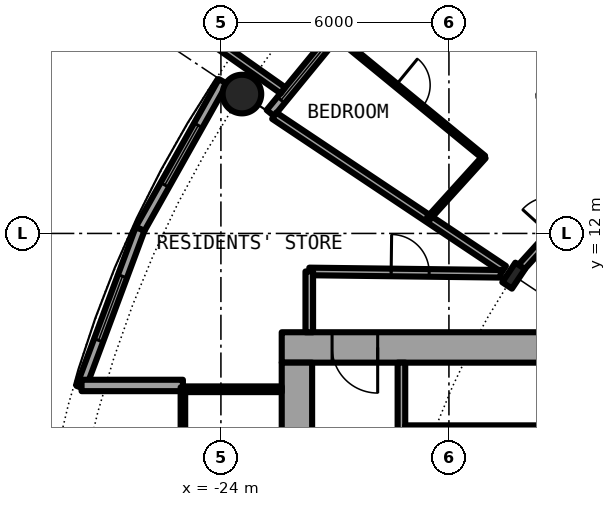
"""IFC4 building model, lengths in metres.
Left out: names, types, materials, properties, quantities, classifications, styles, units other than length and angle.
Written with IfcOpenShell. Run it as: python <this file> out.ifc"""

import sys

from ifc_helpers import new_model, si_unit, direction, frame, frame_2d, origin, origin_2d, place, context, subcontext, project, spatial, rectangle, hollow_circle, i_section, extrude, element, fill, save


model = new_model("IFC4")
c1 = context("Model", 3, precision=1e-05, world=origin(), true_north=direction((0.0, 1.0)))
c2 = subcontext(c1, "Body", "Model", "MODEL_VIEW")
j1 = project(units=[si_unit("LENGTHUNIT", "METRE"), si_unit("PLANEANGLEUNIT", "RADIAN")], contexts=[c1])
p1 = place(None, origin())
s1 = spatial("IfcSite", under=j1, at=p1, CompositionType="ELEMENT")
p2 = place(p1, origin())
s2 = spatial("IfcBuilding", under=s1, at=p2, CompositionType="ELEMENT")
p3 = place(p2, frame((0.0, 0.0, 50.25)))
s3 = spatial("IfcBuildingStorey", under=s2, at=p3, CompositionType="ELEMENT", Elevation=50.25)
p4 = place(p3, frame((-23.448, 15.667, 0.0), z_axis=(0.0, 0.0, 1.0), x_axis=(1.0, 0.0, 0.0)))
e1 = element("IfcColumn", 1, at=p4, inside=s3, PredefinedType="COLUMN", context=c2, shape_type="SweptSolid", body=[
    extrude(hollow_circle(Radius=0.508, WallThickness=0.05, at=origin_2d()), origin(), (0.0, 0.0, 1.0), 3.05),
])
p5 = place(p3, frame((-16.297, 10.889, 0.0), z_axis=(0.0, 0.0, 1.0), x_axis=(-0.831469612303, 0.55557023302, 0.0)))
e2 = element("IfcColumn", 2, at=p5, inside=s3, PredefinedType="COLUMN", context=c2, shape_type="SweptSolid", body=[
    extrude(i_section(OverallWidth=0.305, OverallDepth=0.62, WebThickness=0.021, FlangeThickness=0.04, FilletRadius=0.027, at=origin_2d()), origin(), (0.0, 0.0, 1.0), 3.05),
])
p6 = place(p3, frame((-19.304, 19.304, 0.0), z_axis=(0.0, 0.0, 1.0), x_axis=(-0.634382322723, -0.773019449054, 0.0)))
e3 = element("IfcWall", 3, at=p6, inside=s3, PredefinedType="SOLIDWALL", context=c2, shape_type="SweptSolid", body=[
    extrude(rectangle(XDim=5.352, YDim=0.25, at=frame_2d((2.676, 0.0))), origin(), (0.0, 0.0, 1.0), 2.7),
])
p7 = place(p6, frame((0.841, 0.0, 0.0)))
e4 = element("IfcOpeningElement", 4, at=p7, cuts=e3, PredefinedType="OPENING", context=c2, shape_type="SweptSolid", body=[
    extrude(rectangle(XDim=1.0, YDim=2.2, at=frame_2d((0.5, 1.1))), frame((0.0, 0.135, 0.0), z_axis=(0.0, -1.0, 0.0), x_axis=(1.0, 0.0, 0.0)), (0.0, 0.0, 1.0), 0.27),
])
p8 = place(p6, frame((3.111, 0.0, 0.3)))
e5 = element("IfcOpeningElement", 5, at=p8, cuts=e3, PredefinedType="OPENING", context=c2, shape_type="SweptSolid", body=[
    extrude(rectangle(XDim=1.8, YDim=2.1, at=frame_2d((0.9, 1.05))), frame((0.0, 0.135, 0.0), z_axis=(0.0, -1.0, 0.0), x_axis=(1.0, 0.0, 0.0)), (0.0, 0.0, 1.0), 0.27),
])
p9 = place(p3, frame((-22.37, 15.765, -0.03), z_axis=(0.0, 0.0, 1.0), x_axis=(-0.817256123454, 0.576274612209, 0.0)))
e6 = element("IfcWall", 6, at=p9, inside=s3, PredefinedType="SOLIDWALL", context=c2, shape_type="SweptSolid", body=[
    extrude(rectangle(XDim=2.933, YDim=0.2, at=frame_2d((1.466, 0.0))), origin(), (0.0, 0.0, 1.0), 2.73),
])
p10 = place(p3, frame((-23.946, 16.0, 0.0), z_axis=(0.0, 0.0, 1.0), x_axis=(-0.489696356642, -0.871893042919, 0.0)))
e7 = element("IfcWall", 7, at=p10, inside=s3, PredefinedType="SOLIDWALL", context=c2, shape_type="SweptSolid", body=[
    extrude(rectangle(XDim=4.454, YDim=0.25, at=frame_2d((2.227, 0.0))), origin(), (0.0, 0.0, 1.0), 2.7),
])
p11 = place(p10, frame((1.327, 0.0, 0.3)))
e8 = element("IfcOpeningElement", 8, at=p11, cuts=e7, PredefinedType="OPENING", context=c2, shape_type="SweptSolid", body=[
    extrude(rectangle(XDim=1.8, YDim=2.1, at=frame_2d((0.9, 1.05))), frame((0.0, 0.135, 0.0), z_axis=(0.0, -1.0, 0.0), x_axis=(1.0, 0.0, 0.0)), (0.0, 0.0, 1.0), 0.27),
])
p12 = place(p3, frame((-26.127, 12.117, 0.0), z_axis=(0.0, 0.0, 1.0), x_axis=(-0.349247811493, -0.937030397675, 0.0)))
e9 = element("IfcWall", 9, at=p12, inside=s3, PredefinedType="SOLIDWALL", context=c2, shape_type="SweptSolid", body=[
    extrude(rectangle(XDim=4.452, YDim=0.25, at=frame_2d((2.226, 0.0))), origin(), (0.0, 0.0, 1.0), 2.7),
])
p13 = place(p12, frame((1.327, 0.0, 0.3)))
e10 = element("IfcOpeningElement", 10, at=p13, cuts=e9, PredefinedType="OPENING", context=c2, shape_type="SweptSolid", body=[
    extrude(rectangle(XDim=1.8, YDim=2.1, at=frame_2d((0.9, 1.05))), frame((0.0, 0.135, 0.0), z_axis=(0.0, -1.0, 0.0), x_axis=(1.0, 0.0, 0.0)), (0.0, 0.0, 1.0), 0.27),
])
p14 = place(p3, frame((-25.0, 8.0, 0.0), z_axis=(0.0, 0.0, 1.0), x_axis=(-1.0, 0.0, 0.0)))
e11 = element("IfcWall", 11, at=p14, inside=s3, PredefinedType="SOLIDWALL", context=c2, shape_type="SweptSolid", body=[
    extrude(rectangle(XDim=2.667, YDim=0.3, at=frame_2d((1.333, 0.0))), origin(), (0.0, 0.0, 1.0), 2.7),
])
p15 = place(p3, frame((-8.2, 9.0, 0.0), z_axis=(0.0, 0.0, 1.0), x_axis=(-1.0, 0.0, 0.0)))
e12 = element("IfcWall", 12, at=p15, inside=s3, PredefinedType="SHEAR", context=c2, shape_type="SweptSolid", body=[
    extrude(rectangle(XDim=14.2, YDim=0.8, at=frame_2d((7.1, 0.0))), origin(), (0.0, 0.0, 1.0), 3.05),
])
p16 = place(p15, frame((11.675, 0.0, 0.0)))
e13 = element("IfcOpeningElement", 13, at=p16, cuts=e12, PredefinedType="OPENING", context=c2, shape_type="SweptSolid", body=[
    extrude(rectangle(XDim=1.2, YDim=2.3, at=frame_2d((0.6, 1.15))), frame((0.0, 0.41, 0.0), z_axis=(0.0, -1.0, 0.0), x_axis=(1.0, 0.0, 0.0)), (0.0, 0.0, 1.0), 0.82),
])
p17 = place(p3, frame((-22.0, -8.6, 0.0), z_axis=(0.0, 0.0, 1.0), x_axis=(0.0, 1.0, 0.0)))
e14 = element("IfcWall", 14, at=p17, inside=s3, PredefinedType="SHEAR", context=c2, shape_type="SweptSolid", body=[
    extrude(rectangle(XDim=17.2, YDim=0.8, at=frame_2d((8.6, 0.0))), origin(), (0.0, 0.0, 1.0), 3.05),
])
p18 = place(p17, frame((7.7, 0.0, 0.0)))
e15 = element("IfcOpeningElement", 15, at=p18, cuts=e14, PredefinedType="OPENING", context=c2, shape_type="SweptSolid", body=[
    extrude(rectangle(XDim=1.8, YDim=2.3, at=frame_2d((0.9, 1.15))), frame((0.0, 0.41, 0.0), z_axis=(0.0, -1.0, 0.0), x_axis=(1.0, 0.0, 0.0)), (0.0, 0.0, 1.0), 0.82),
])
p19 = place(p3, frame((-19.25, 8.6, 0.0), z_axis=(0.0, 0.0, 1.0), x_axis=(0.0, -1.0, 0.0)))
e16 = element("IfcWall", 16, at=p19, inside=s3, PredefinedType="SOLIDWALL", context=c2, shape_type="SweptSolid", body=[
    extrude(rectangle(XDim=7.025, YDim=0.2, at=frame_2d((3.513, 0.0))), origin(), (0.0, 0.0, 1.0), 2.7),
])
p20 = place(p19, frame((2.35, 0.0, 0.0)))
e17 = element("IfcOpeningElement", 17, at=p20, cuts=e16, PredefinedType="OPENING", context=c2, shape_type="SweptSolid", body=[
    extrude(rectangle(XDim=1.1, YDim=2.3, at=frame_2d((0.55, 1.15))), frame((0.0, 0.11, 0.0), z_axis=(0.0, -1.0, 0.0), x_axis=(1.0, 0.0, 0.0)), (0.0, 0.0, 1.0), 0.22),
])
p21 = place(p3, frame((-15.45, 6.875, 0.0), z_axis=(0.0, 0.0, 1.0), x_axis=(-1.0, 0.0, 0.0)))
e18 = element("IfcWall", 18, at=p21, inside=s3, PredefinedType="PARTITIONING", context=c2, shape_type="SweptSolid", body=[
    extrude(rectangle(XDim=3.7, YDim=0.15, at=frame_2d((1.85, 0.0))), origin(), (0.0, 0.0, 1.0), 2.7),
])
p22 = place(p21, frame((1.4, 0.0, 0.0)))
e19 = element("IfcOpeningElement", 19, at=p22, cuts=e18, PredefinedType="OPENING", context=c2, shape_type="SweptSolid", body=[
    extrude(rectangle(XDim=0.9, YDim=2.3, at=frame_2d((0.45, 1.15))), frame((0.0, 0.085, 0.0), z_axis=(0.0, -1.0, 0.0), x_axis=(1.0, 0.0, 0.0)), (0.0, 0.0, 1.0), 0.17),
])
p23 = place(p3, frame((-22.4, 7.9, 0.0), z_axis=(0.0, 0.0, 1.0), x_axis=(-1.0, 0.0, 0.0)))
e20 = element("IfcWall", 20, at=p23, inside=s3, PredefinedType="PARTITIONING", context=c2, shape_type="SweptSolid", body=[
    extrude(rectangle(XDim=2.54, YDim=0.15, at=frame_2d((1.27, 0.0))), origin(), (0.0, 0.0, 1.0), 2.7),
])
p24 = place(p3, frame((-25.0, 7.95, 0.0), z_axis=(0.0, 0.0, 1.0), x_axis=(0.0, -1.0, 0.0)))
e21 = element("IfcWall", 21, at=p24, inside=s3, PredefinedType="PARTITIONING", context=c2, shape_type="SweptSolid", body=[
    extrude(rectangle(XDim=15.9, YDim=0.12, at=frame_2d((7.95, 0.0))), origin(), (0.0, 0.0, 1.0), 2.7),
])
p25 = place(p24, frame((0.95, 0.0, 0.1)))
e22 = element("IfcOpeningElement", 22, at=p25, cuts=e21, PredefinedType="OPENING", context=c2, shape_type="SweptSolid", body=[
    extrude(rectangle(XDim=14.0, YDim=2.35, at=frame_2d((7.0, 1.175))), frame((0.0, 0.07, 0.0), z_axis=(0.0, -1.0, 0.0), x_axis=(1.0, 0.0, 0.0)), (0.0, 0.0, 1.0), 0.14),
])
p26 = place(p3, frame((-22.596, 15.097, 0.0), z_axis=(0.0, 0.0, 1.0), x_axis=(0.831507055747, -0.555514190857, 0.0)))
e23 = element("IfcWall", 23, at=p26, inside=s3, PredefinedType="PARTITIONING", context=c2, shape_type="SweptSolid", body=[
    extrude(rectangle(XDim=7.265, YDim=0.2, at=frame_2d((3.633, 0.0))), origin(), (0.0, 0.0, 1.0), 2.7),
])
p27 = place(p3, frame((-21.014, 17.231, 0.0), z_axis=(0.0, 0.0, 1.0), x_axis=(0.773219330916, -0.634138680651, 0.0)))
e24 = element("IfcWall", 24, at=p27, inside=s3, PredefinedType="PARTITIONING", context=c2, shape_type="SweptSolid", body=[
    extrude(rectangle(XDim=5.089, YDim=0.1, at=frame_2d((2.544, 0.0))), origin(), (0.0, 0.0, 1.0), 2.7),
])
p28 = place(p27, frame((2.095, 0.0, 0.0)))
e25 = element("IfcOpeningElement", 25, at=p28, cuts=e24, PredefinedType="OPENING", context=c2, shape_type="SweptSolid", body=[
    extrude(rectangle(XDim=0.9, YDim=2.3, at=frame_2d((0.45, 1.15))), frame((0.0, 0.06, 0.0), z_axis=(0.0, -1.0, 0.0), x_axis=(1.0, 0.0, 0.0)), (0.0, 0.0, 1.0), 0.12),
])
p29 = place(p3, frame((-17.243, 21.005, 0.0), z_axis=(0.0, 0.0, 1.0), x_axis=(0.63447412651, -0.772944100689, 0.0)))
e26 = element("IfcWall", 26, at=p29, inside=s3, PredefinedType="PARTITIONING", context=c2, shape_type="SweptSolid", body=[
    extrude(rectangle(XDim=7.576, YDim=0.2, at=frame_2d((3.788, 0.0))), origin(), (0.0, 0.0, 1.0), 2.7),
])
p30 = place(p3, frame((-21.675, 11.0, 0.0), z_axis=(0.0, 0.0, 1.0), x_axis=(0.99992425795, -0.012307654658, 0.0)))
e27 = element("IfcWall", 27, at=p30, inside=s3, PredefinedType="PARTITIONING", context=c2, shape_type="SweptSolid", body=[
    extrude(rectangle(XDim=5.039, YDim=0.2, at=frame_2d((2.519, 0.0))), origin(), (0.0, 0.0, 1.0), 2.7),
])
p31 = place(p30, frame((2.155, 0.0, 0.0)))
e28 = element("IfcOpeningElement", 28, at=p31, cuts=e27, PredefinedType="OPENING", context=c2, shape_type="SweptSolid", body=[
    extrude(rectangle(XDim=1.0, YDim=2.3, at=frame_2d((0.5, 1.15))), frame((0.0, 0.11, 0.0), z_axis=(0.0, -1.0, 0.0), x_axis=(1.0, 0.0, 0.0)), (0.0, 0.0, 1.0), 0.22),
])
p32 = place(p3, frame((-16.193, 11.003, 0.0), z_axis=(0.0, 0.0, 1.0), x_axis=(0.671514934772, 0.740991020444, 0.0)))
e29 = element("IfcWall", 29, at=p32, inside=s3, PredefinedType="PARTITIONING", context=c2, shape_type="SweptSolid", body=[
    extrude(rectangle(XDim=5.598, YDim=0.2, at=frame_2d((2.799, 0.0))), origin(), (0.0, 0.0, 1.0), 2.38),
])
p33 = place(p32, frame((1.293, 0.0, 0.0)))
e30 = element("IfcOpeningElement", 30, at=p33, cuts=e29, PredefinedType="OPENING", context=c2, shape_type="SweptSolid", body=[
    extrude(rectangle(XDim=1.0, YDim=2.3, at=frame_2d((0.5, 1.15))), frame((0.0, 0.11, 0.0), z_axis=(0.0, -1.0, 0.0), x_axis=(1.0, 0.0, 0.0)), (0.0, 0.0, 1.0), 0.22),
])
p34 = place(p3, frame((-21.675, 9.4, 0.0), z_axis=(0.0, 0.0, 1.0), x_axis=(0.0, 1.0, 0.0)))
e31 = element("IfcWall", 31, at=p34, inside=s3, PredefinedType="PARTITIONING", context=c2, shape_type="SweptSolid", body=[
    extrude(rectangle(XDim=1.6, YDim=0.2, at=frame_2d((0.8, 0.0))), origin(), (0.0, 0.0, 1.0), 2.7),
])
p35 = place(p3, frame((-18.538, 12.394, 0.0), z_axis=(0.0, 0.0, 1.0), x_axis=(0.67169789574, 0.740825172937, 0.0)))
e32 = element("IfcWall", 32, at=p35, inside=s3, PredefinedType="PARTITIONING", context=c2, shape_type="SweptSolid", body=[
    extrude(rectangle(XDim=2.183, YDim=0.1, at=frame_2d((1.091, 0.0))), origin(), (0.0, 0.0, 1.0), 2.7),
])
p36 = place(p8, origin())
e33 = element("IfcWindow", 33, at=p36, inside=s3, PartitioningType="SINGLE_PANEL", PredefinedType="WINDOW", context=c2, shape_type="SweptSolid", body=[
    extrude(rectangle(XDim=1.8, YDim=2.1, at=frame_2d((0.9, 1.05))), frame((0.0, 0.03, 0.0), z_axis=(0.0, -1.0, 0.0), x_axis=(1.0, 0.0, 0.0)), (0.0, 0.0, 1.0), 0.06),
])
fill(e5, e33)
p37 = place(p11, origin())
e34 = element("IfcWindow", 34, at=p37, inside=s3, PartitioningType="SINGLE_PANEL", PredefinedType="WINDOW", context=c2, shape_type="SweptSolid", body=[
    extrude(rectangle(XDim=1.8, YDim=2.1, at=frame_2d((0.9, 1.05))), frame((0.0, 0.03, 0.0), z_axis=(0.0, -1.0, 0.0), x_axis=(1.0, 0.0, 0.0)), (0.0, 0.0, 1.0), 0.06),
])
fill(e8, e34)
p38 = place(p13, origin())
e35 = element("IfcWindow", 35, at=p38, inside=s3, PartitioningType="SINGLE_PANEL", PredefinedType="WINDOW", context=c2, shape_type="SweptSolid", body=[
    extrude(rectangle(XDim=1.8, YDim=2.1, at=frame_2d((0.9, 1.05))), frame((0.0, 0.03, 0.0), z_axis=(0.0, -1.0, 0.0), x_axis=(1.0, 0.0, 0.0)), (0.0, 0.0, 1.0), 0.06),
])
fill(e10, e35)
p39 = place(p22, origin())
e36 = element("IfcDoor", 36, at=p39, inside=s3, OperationType="SINGLE_SWING_LEFT", PredefinedType="DOOR", context=c2, shape_type="SweptSolid", body=[
    extrude(rectangle(XDim=0.9, YDim=2.3, at=frame_2d((0.45, 1.15))), frame((0.0, 0.025, 0.0), z_axis=(0.0, -1.0, 0.0), x_axis=(1.0, 0.0, 0.0)), (0.0, 0.0, 1.0), 0.05),
])
fill(e19, e36)
p40 = place(p16, origin())
e37 = element("IfcDoor", 37, at=p40, inside=s3, OperationType="SINGLE_SWING_LEFT", PredefinedType="DOOR", context=c2, shape_type="SweptSolid", body=[
    extrude(rectangle(XDim=1.2, YDim=2.3, at=frame_2d((0.6, 1.15))), frame((0.0, 0.025, 0.0), z_axis=(0.0, -1.0, 0.0), x_axis=(1.0, 0.0, 0.0)), (0.0, 0.0, 1.0), 0.05),
])
fill(e13, e37)
p41 = place(p25, origin())
e38 = element("IfcWindow", 38, at=p41, inside=s3, PartitioningType="SINGLE_PANEL", PredefinedType="WINDOW", context=c2, shape_type="SweptSolid", body=[
    extrude(rectangle(XDim=14.0, YDim=2.35, at=frame_2d((7.0, 1.175))), frame((0.0, 0.03, 0.0), z_axis=(0.0, -1.0, 0.0), x_axis=(1.0, 0.0, 0.0)), (0.0, 0.0, 1.0), 0.06),
])
fill(e22, e38)
p42 = place(p28, origin())
e39 = element("IfcDoor", 39, at=p42, inside=s3, OperationType="SINGLE_SWING_RIGHT", PredefinedType="DOOR", context=c2, shape_type="SweptSolid", body=[
    extrude(rectangle(XDim=0.9, YDim=2.3, at=frame_2d((0.45, 1.15))), frame((0.0, 0.025, 0.0), z_axis=(0.0, -1.0, 0.0), x_axis=(1.0, 0.0, 0.0)), (0.0, 0.0, 1.0), 0.05),
])
fill(e25, e39)
p43 = place(p31, origin())
e40 = element("IfcDoor", 40, at=p43, inside=s3, OperationType="SINGLE_SWING_RIGHT", PredefinedType="DOOR", context=c2, shape_type="SweptSolid", body=[
    extrude(rectangle(XDim=1.0, YDim=2.3, at=frame_2d((0.5, 1.15))), frame((0.0, 0.025, 0.0), z_axis=(0.0, -1.0, 0.0), x_axis=(1.0, 0.0, 0.0)), (0.0, 0.0, 1.0), 0.05),
])
fill(e28, e40)
save(model, sys.argv[1])
